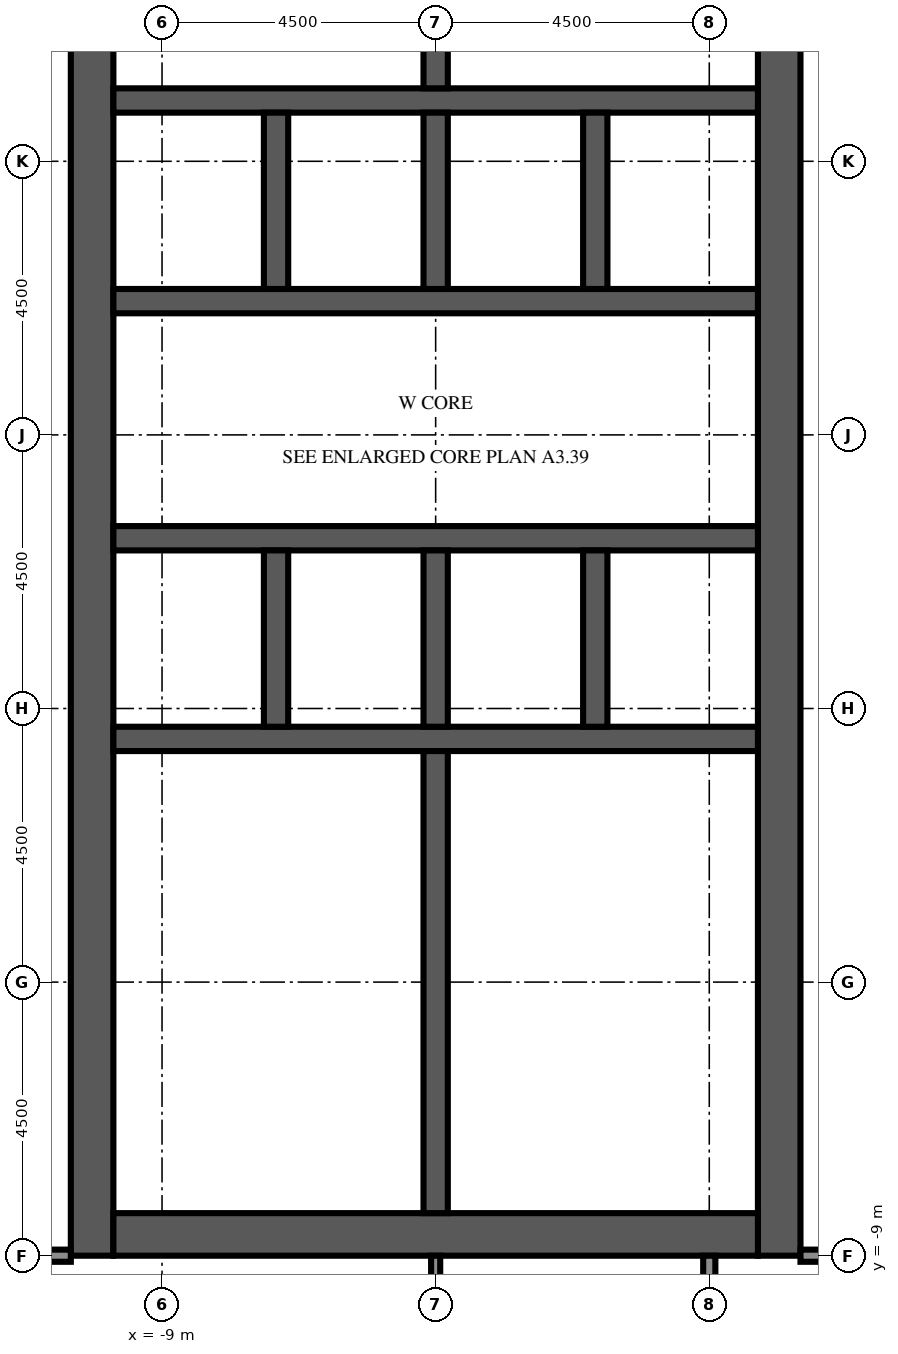
"""IFC4 building model, lengths in metres.
Left out: names, types, materials, properties, quantities, classifications, styles, units other than length and angle.
Written with IfcOpenShell. Run it as: python <this file> out.ifc"""

import sys

from ifc_helpers import new_model, si_unit, direction, frame, frame_2d, origin, place, context, subcontext, project, spatial, rectangle, extrude, element, fill, save


model = new_model("IFC4")
c1 = context("Model", 3, precision=1e-05, world=origin(), true_north=direction((0.0, 1.0)))
c2 = subcontext(c1, "Body", "Model", "MODEL_VIEW")
j1 = project(units=[si_unit("LENGTHUNIT", "METRE"), si_unit("PLANEANGLEUNIT", "RADIAN")], contexts=[c1])
p1 = place(None, origin())
s1 = spatial("IfcSite", under=j1, at=p1, CompositionType="ELEMENT")
p2 = place(p1, origin())
s2 = spatial("IfcBuilding", under=s1, at=p2, CompositionType="ELEMENT")
p3 = place(p2, frame((0.0, 0.0, 266.3)))
s3 = spatial("IfcBuildingStorey", under=s2, at=p3, CompositionType="ELEMENT", Elevation=266.3)
p4 = place(p3, frame((-10.15, -9.0, 0.0), z_axis=(0.0, 0.0, 1.0), x_axis=(0.0, 1.0, 0.0)))
e1 = element("IfcWall", 1, at=p4, inside=s3, PredefinedType="SHEAR", context=c2, shape_type="SweptSolid", body=[
    extrude(rectangle(XDim=27.5, YDim=0.7, at=frame_2d((13.75, 0.0))), origin(), (0.0, 0.0, 1.0), 4.1),
])
p5 = place(p4, frame((12.55, 0.0, 0.0)))
e2 = element("IfcOpeningElement", 2, at=p5, cuts=e1, PredefinedType="OPENING", context=c2, shape_type="SweptSolid", body=[
    extrude(rectangle(XDim=2.4, YDim=2.4, at=frame_2d((1.2, 1.2))), frame((0.0, 0.36, 0.0), z_axis=(0.0, -1.0, 0.0), x_axis=(1.0, 0.0, 0.0)), (0.0, 0.0, 1.0), 0.72),
])
p6 = place(p4, frame((6.825, 0.0, 0.0)))
e3 = element("IfcOpeningElement", 3, at=p6, cuts=e1, PredefinedType="OPENING", context=c2, shape_type="SweptSolid", body=[
    extrude(rectangle(XDim=1.2, YDim=2.1, at=frame_2d((0.6, 1.05))), frame((0.0, 0.36, 0.0), z_axis=(0.0, -1.0, 0.0), x_axis=(1.0, 0.0, 0.0)), (0.0, 0.0, 1.0), 0.72),
])
p7 = place(p4, frame((19.475, 0.0, 0.0)))
e4 = element("IfcOpeningElement", 4, at=p7, cuts=e1, PredefinedType="OPENING", context=c2, shape_type="SweptSolid", body=[
    extrude(rectangle(XDim=1.2, YDim=2.1, at=frame_2d((0.6, 1.05))), frame((0.0, 0.36, 0.0), z_axis=(0.0, -1.0, 0.0), x_axis=(1.0, 0.0, 0.0)), (0.0, 0.0, 1.0), 0.72),
])
p8 = place(p3, frame((1.15, -9.0, 0.0), z_axis=(0.0, 0.0, 1.0), x_axis=(0.0, 1.0, 0.0)))
e5 = element("IfcWall", 5, at=p8, inside=s3, PredefinedType="SHEAR", context=c2, shape_type="SweptSolid", body=[
    extrude(rectangle(XDim=27.5, YDim=0.7, at=frame_2d((13.75, 0.0))), origin(), (0.0, 0.0, 1.0), 4.1),
])
p9 = place(p8, frame((12.55, 0.0, 0.0)))
e6 = element("IfcOpeningElement", 6, at=p9, cuts=e5, PredefinedType="OPENING", context=c2, shape_type="SweptSolid", body=[
    extrude(rectangle(XDim=2.4, YDim=2.4, at=frame_2d((1.2, 1.2))), frame((0.0, 0.36, 0.0), z_axis=(0.0, -1.0, 0.0), x_axis=(1.0, 0.0, 0.0)), (0.0, 0.0, 1.0), 0.72),
])
p10 = place(p8, frame((3.788, 0.0, 0.0)))
e7 = element("IfcOpeningElement", 7, at=p10, cuts=e5, PredefinedType="OPENING", context=c2, shape_type="SweptSolid", body=[
    extrude(rectangle(XDim=0.968, YDim=2.1, at=frame_2d((0.484, 1.05))), frame((0.0, 0.36, 0.0), z_axis=(0.0, -1.0, 0.0), x_axis=(1.0, 0.0, 0.0)), (0.0, 0.0, 1.0), 0.72),
])
p11 = place(p8, frame((23.54, 0.0, 0.0)))
e8 = element("IfcOpeningElement", 8, at=p11, cuts=e5, PredefinedType="OPENING", context=c2, shape_type="SweptSolid", body=[
    extrude(rectangle(XDim=1.2, YDim=2.1, at=frame_2d((0.6, 1.05))), frame((0.0, 0.36, 0.0), z_axis=(0.0, -1.0, 0.0), x_axis=(1.0, 0.0, 0.0)), (0.0, 0.0, 1.0), 0.72),
])
p12 = place(p3, frame((-9.8, -8.65, 0.0), z_axis=(0.0, 0.0, 1.0), x_axis=(1.0, 0.0, 0.0)))
e9 = element("IfcWall", 9, at=p12, inside=s3, PredefinedType="SHEAR", context=c2, shape_type="SweptSolid", body=[
    extrude(rectangle(XDim=10.6, YDim=0.7, at=frame_2d((5.3, 0.0))), origin(), (0.0, 0.0, 1.0), 4.1),
])
p13 = place(p3, frame((-9.8, -0.5, 0.0), z_axis=(0.0, 0.0, 1.0), x_axis=(1.0, 0.0, 0.0)))
e10 = element("IfcWall", 10, at=p13, inside=s3, PredefinedType="SHEAR", context=c2, shape_type="SweptSolid", body=[
    extrude(rectangle(XDim=10.6, YDim=0.4, at=frame_2d((5.3, 0.0))), origin(), (0.0, 0.0, 1.0), 4.1),
])
p14 = place(p3, frame((-9.8, 2.8, 0.0), z_axis=(0.0, 0.0, 1.0), x_axis=(1.0, 0.0, 0.0)))
e11 = element("IfcWall", 11, at=p14, inside=s3, PredefinedType="SHEAR", context=c2, shape_type="SweptSolid", body=[
    extrude(rectangle(XDim=10.6, YDim=0.4, at=frame_2d((5.3, 0.0))), origin(), (0.0, 0.0, 1.0), 4.1),
])
p15 = place(p14, frame((0.688, 0.0, 0.0)))
e12 = element("IfcOpeningElement", 12, at=p15, cuts=e11, PredefinedType="OPENING", context=c2, shape_type="SweptSolid", body=[
    extrude(rectangle(XDim=1.1, YDim=2.1, at=frame_2d((0.55, 1.05))), frame((0.0, 0.21, 0.0), z_axis=(0.0, -1.0, 0.0), x_axis=(1.0, 0.0, 0.0)), (0.0, 0.0, 1.0), 0.42),
])
p16 = place(p14, frame((3.438, 0.0, 0.0)))
e13 = element("IfcOpeningElement", 13, at=p16, cuts=e11, PredefinedType="OPENING", context=c2, shape_type="SweptSolid", body=[
    extrude(rectangle(XDim=1.1, YDim=2.1, at=frame_2d((0.55, 1.05))), frame((0.0, 0.21, 0.0), z_axis=(0.0, -1.0, 0.0), x_axis=(1.0, 0.0, 0.0)), (0.0, 0.0, 1.0), 0.42),
])
p17 = place(p14, frame((6.113, 0.0, 0.0)))
e14 = element("IfcOpeningElement", 14, at=p17, cuts=e11, PredefinedType="OPENING", context=c2, shape_type="SweptSolid", body=[
    extrude(rectangle(XDim=1.0, YDim=2.1, at=frame_2d((0.5, 1.05))), frame((0.0, 0.21, 0.0), z_axis=(0.0, -1.0, 0.0), x_axis=(1.0, 0.0, 0.0)), (0.0, 0.0, 1.0), 0.42),
])
p18 = place(p14, frame((8.863, 0.0, 0.0)))
e15 = element("IfcOpeningElement", 15, at=p18, cuts=e11, PredefinedType="OPENING", context=c2, shape_type="SweptSolid", body=[
    extrude(rectangle(XDim=1.0, YDim=2.1, at=frame_2d((0.5, 1.05))), frame((0.0, 0.21, 0.0), z_axis=(0.0, -1.0, 0.0), x_axis=(1.0, 0.0, 0.0)), (0.0, 0.0, 1.0), 0.42),
])
p19 = place(p3, frame((-9.8, 6.7, 0.0), z_axis=(0.0, 0.0, 1.0), x_axis=(1.0, 0.0, 0.0)))
e16 = element("IfcWall", 16, at=p19, inside=s3, PredefinedType="SHEAR", context=c2, shape_type="SweptSolid", body=[
    extrude(rectangle(XDim=10.6, YDim=0.4, at=frame_2d((5.3, 0.0))), origin(), (0.0, 0.0, 1.0), 4.1),
])
p20 = place(p19, frame((3.438, 0.0, 0.0)))
e17 = element("IfcOpeningElement", 17, at=p20, cuts=e16, PredefinedType="OPENING", context=c2, shape_type="SweptSolid", body=[
    extrude(rectangle(XDim=1.1, YDim=2.1, at=frame_2d((0.55, 1.05))), frame((0.0, 0.21, 0.0), z_axis=(0.0, -1.0, 0.0), x_axis=(1.0, 0.0, 0.0)), (0.0, 0.0, 1.0), 0.42),
])
p21 = place(p19, frame((6.062, 0.0, 0.0)))
e18 = element("IfcOpeningElement", 18, at=p21, cuts=e16, PredefinedType="OPENING", context=c2, shape_type="SweptSolid", body=[
    extrude(rectangle(XDim=1.1, YDim=2.1, at=frame_2d((0.55, 1.05))), frame((0.0, 0.21, 0.0), z_axis=(0.0, -1.0, 0.0), x_axis=(1.0, 0.0, 0.0)), (0.0, 0.0, 1.0), 0.42),
])
p22 = place(p19, frame((8.812, 0.0, 0.0)))
e19 = element("IfcOpeningElement", 19, at=p22, cuts=e16, PredefinedType="OPENING", context=c2, shape_type="SweptSolid", body=[
    extrude(rectangle(XDim=1.1, YDim=2.1, at=frame_2d((0.55, 1.05))), frame((0.0, 0.21, 0.0), z_axis=(0.0, -1.0, 0.0), x_axis=(1.0, 0.0, 0.0)), (0.0, 0.0, 1.0), 0.42),
])
p23 = place(p19, frame((0.738, 0.0, 0.0)))
e20 = element("IfcOpeningElement", 20, at=p23, cuts=e16, PredefinedType="OPENING", context=c2, shape_type="SweptSolid", body=[
    extrude(rectangle(XDim=1.0, YDim=2.1, at=frame_2d((0.5, 1.05))), frame((0.0, 0.21, 0.0), z_axis=(0.0, -1.0, 0.0), x_axis=(1.0, 0.0, 0.0)), (0.0, 0.0, 1.0), 0.42),
])
p24 = place(p3, frame((-9.8, 10.0, 0.0), z_axis=(0.0, 0.0, 1.0), x_axis=(1.0, 0.0, 0.0)))
e21 = element("IfcWall", 21, at=p24, inside=s3, PredefinedType="SHEAR", context=c2, shape_type="SweptSolid", body=[
    extrude(rectangle(XDim=10.6, YDim=0.4, at=frame_2d((5.3, 0.0))), origin(), (0.0, 0.0, 1.0), 4.1),
])
for number, where, z_axis, x_axis in (
    (22, (-7.125, -0.3, 0.0), (0.0, 0.0, 1.0), (0.0, 1.0, 0.0)),
    (23, (-7.125, 6.9, 0.0), (0.0, 0.0, 1.0), (0.0, 1.0, 0.0)),
    (24, (-4.5, -0.3, 0.0), (0.0, 0.0, 1.0), (0.0, 1.0, 0.0)),
    (25, (-4.5, 6.9, 0.0), (0.0, 0.0, 1.0), (0.0, 1.0, 0.0)),
    (26, (-1.875, -0.3, 0.0), (0.0, 0.0, 1.0), (0.0, 1.0, 0.0)),
    (27, (-1.875, 6.9, 0.0), (0.0, 0.0, 1.0), (0.0, 1.0, 0.0)),
):
    element("IfcWall", number, at=place(p3, frame(where, z_axis=z_axis, x_axis=x_axis)), inside=s3, PredefinedType="SHEAR", context=c2, shape_type="SweptSolid", body=[
        extrude(rectangle(XDim=2.9, YDim=0.4, at=frame_2d((1.45, 0.0))), origin(), (0.0, 0.0, 1.0), 4.1),
    ])
for number, where, z_axis, x_axis in (
    (28, (-4.5, -8.3, 0.0), (0.0, 0.0, 1.0), (0.0, 1.0, 0.0)),
    (29, (-4.5, 10.2, 0.0), (0.0, 0.0, 1.0), (0.0, 1.0, 0.0)),
):
    element("IfcWall", number, at=place(p3, frame(where, z_axis=z_axis, x_axis=x_axis)), inside=s3, PredefinedType="SHEAR", context=c2, shape_type="SweptSolid", body=[
        extrude(rectangle(XDim=7.6, YDim=0.4, at=frame_2d((3.8, 0.0))), origin(), (0.0, 0.0, 1.0), 4.1),
    ])
p25 = place(p3, frame((-4.3, -5.412, 0.0), z_axis=(0.0, 0.0, 1.0), x_axis=(1.0, 0.0, 0.0)))
e30 = element("IfcWall", 30, at=p25, inside=s3, PredefinedType="PARTITIONING", context=c2, shape_type="SweptSolid", body=[
    extrude(rectangle(XDim=5.1, YDim=0.1, at=frame_2d((2.55, 0.0))), origin(), (0.0, 0.0, 1.0), 3.65),
])
p26 = place(p25, frame((2.05, 0.0, 0.0)))
e31 = element("IfcOpeningElement", 31, at=p26, cuts=e30, PredefinedType="OPENING", context=c2, shape_type="SweptSolid", body=[
    extrude(rectangle(XDim=1.0, YDim=2.1, at=frame_2d((0.5, 1.05))), frame((0.0, 0.06, 0.0), z_axis=(0.0, -1.0, 0.0), x_axis=(1.0, 0.0, 0.0)), (0.0, 0.0, 1.0), 0.12),
])
p27 = place(p3, frame((-2.362, -4.044, 0.0), z_axis=(0.0, 0.0, 1.0), x_axis=(1.0, 0.0, 0.0)))
e32 = element("IfcWall", 32, at=p27, inside=s3, PredefinedType="PARTITIONING", context=c2, shape_type="SweptSolid", body=[
    extrude(rectangle(XDim=3.162, YDim=0.1, at=frame_2d((1.581, 0.0))), origin(), (0.0, 0.0, 1.0), 3.65),
])
p28 = place(p27, frame((1.081, 0.0, 0.0)))
e33 = element("IfcOpeningElement", 33, at=p28, cuts=e32, PredefinedType="OPENING", context=c2, shape_type="SweptSolid", body=[
    extrude(rectangle(XDim=1.0, YDim=2.1, at=frame_2d((0.5, 1.05))), frame((0.0, 0.06, 0.0), z_axis=(0.0, -1.0, 0.0), x_axis=(1.0, 0.0, 0.0)), (0.0, 0.0, 1.0), 0.12),
])
p29 = place(p3, frame((-4.3, -4.044, 0.0), z_axis=(0.0, 0.0, 1.0), x_axis=(1.0, 0.0, 0.0)))
e34 = element("IfcWall", 34, at=p29, inside=s3, PredefinedType="PARTITIONING", context=c2, shape_type="SweptSolid", body=[
    extrude(rectangle(XDim=1.938, YDim=0.1, at=frame_2d((0.969, 0.0))), origin(), (0.0, 0.0, 1.0), 3.65),
])
p30 = place(p29, frame((0.469, 0.0, 0.0)))
e35 = element("IfcOpeningElement", 35, at=p30, cuts=e34, PredefinedType="OPENING", context=c2, shape_type="SweptSolid", body=[
    extrude(rectangle(XDim=1.0, YDim=2.1, at=frame_2d((0.5, 1.05))), frame((0.0, 0.06, 0.0), z_axis=(0.0, -1.0, 0.0), x_axis=(1.0, 0.0, 0.0)), (0.0, 0.0, 1.0), 0.12),
])
p31 = place(p3, frame((-2.362, -4.044, 0.0), z_axis=(0.0, 0.0, 1.0), x_axis=(0.0, 1.0, 0.0)))
e36 = element("IfcWall", 36, at=p31, inside=s3, PredefinedType="PARTITIONING", context=c2, shape_type="SweptSolid", body=[
    extrude(rectangle(XDim=3.344, YDim=0.1, at=frame_2d((1.672, 0.0))), origin(), (0.0, 0.0, 1.0), 3.65),
])
p32 = place(p3, frame((-4.5, -9.0, 0.0), z_axis=(0.0, 0.0, 1.0), x_axis=(0.0, -1.0, 0.0)))
e37 = element("IfcWall", 37, at=p32, inside=s3, PredefinedType="PARTITIONING", context=c2, shape_type="SweptSolid", body=[
    extrude(rectangle(XDim=8.6, YDim=0.15, at=frame_2d((4.3, 0.0))), origin(), (0.0, 0.0, 1.0), 3.65),
])
p33 = place(p32, frame((4.15, 0.0, 0.0)))
e38 = element("IfcOpeningElement", 38, at=p33, cuts=e37, PredefinedType="OPENING", context=c2, shape_type="SweptSolid", body=[
    extrude(rectangle(XDim=1.0, YDim=2.1, at=frame_2d((0.5, 1.05))), frame((0.0, 0.085, 0.0), z_axis=(0.0, -1.0, 0.0), x_axis=(1.0, 0.0, 0.0)), (0.0, 0.0, 1.0), 0.17),
])
p34 = place(p3, frame((0.0, -17.6, 0.0), z_axis=(0.0, 0.0, 1.0), x_axis=(0.0, 1.0, 0.0)))
e39 = element("IfcWall", 39, at=p34, inside=s3, PredefinedType="PARTITIONING", context=c2, shape_type="SweptSolid", body=[
    extrude(rectangle(XDim=8.6, YDim=0.2, at=frame_2d((4.3, 0.0))), origin(), (0.0, 0.0, 1.0), 3.65),
])
p35 = place(p3, frame((-13.5, -9.0, 0.0), z_axis=(0.0, 0.0, 1.0), x_axis=(1.0, 0.0, 0.0)))
e40 = element("IfcWall", 40, at=p35, inside=s3, PredefinedType="PARTITIONING", context=c2, shape_type="SweptSolid", body=[
    extrude(rectangle(XDim=3.0, YDim=0.2, at=frame_2d((1.5, 0.0))), origin(), (0.0, 0.0, 1.0), 3.65),
])
p36 = place(p3, frame((6.0, -9.0, 0.0), z_axis=(0.0, 0.0, 1.0), x_axis=(-1.0, 0.0, 0.0)))
e41 = element("IfcWall", 41, at=p36, inside=s3, PredefinedType="PARTITIONING", context=c2, shape_type="SweptSolid", body=[
    extrude(rectangle(XDim=4.5, YDim=0.2, at=frame_2d((2.25, 0.0))), origin(), (0.0, 0.0, 1.0), 3.65),
])
p37 = place(p36, frame((2.4, 0.0, 0.0)))
e42 = element("IfcOpeningElement", 42, at=p37, cuts=e41, PredefinedType="OPENING", context=c2, shape_type="SweptSolid", body=[
    extrude(rectangle(XDim=1.0, YDim=2.1, at=frame_2d((0.5, 1.05))), frame((0.0, 0.11, 0.0), z_axis=(0.0, -1.0, 0.0), x_axis=(1.0, 0.0, 0.0)), (0.0, 0.0, 1.0), 0.22),
])
p38 = place(p36, frame((0.4, 0.0, 0.0)))
e43 = element("IfcOpeningElement", 43, at=p38, cuts=e41, PredefinedType="OPENING", context=c2, shape_type="SweptSolid", body=[
    extrude(rectangle(XDim=1.0, YDim=2.1, at=frame_2d((0.5, 1.05))), frame((0.0, 0.11, 0.0), z_axis=(0.0, -1.0, 0.0), x_axis=(1.0, 0.0, 0.0)), (0.0, 0.0, 1.0), 0.22),
])
p39 = place(p15, origin())
e44 = element("IfcDoor", 44, at=p39, inside=s3, OperationType="DOUBLE_DOOR_SLIDING", PredefinedType="DOOR", context=c2, shape_type="SweptSolid", body=[
    extrude(rectangle(XDim=1.1, YDim=2.1, at=frame_2d((0.55, 1.05))), frame((0.0, 0.025, 0.0), z_axis=(0.0, -1.0, 0.0), x_axis=(1.0, 0.0, 0.0)), (0.0, 0.0, 1.0), 0.05),
])
fill(e12, e44)
p40 = place(p16, origin())
e45 = element("IfcDoor", 45, at=p40, inside=s3, OperationType="DOUBLE_DOOR_SLIDING", PredefinedType="DOOR", context=c2, shape_type="SweptSolid", body=[
    extrude(rectangle(XDim=1.1, YDim=2.1, at=frame_2d((0.55, 1.05))), frame((0.0, 0.025, 0.0), z_axis=(0.0, -1.0, 0.0), x_axis=(1.0, 0.0, 0.0)), (0.0, 0.0, 1.0), 0.05),
])
fill(e13, e45)
p41 = place(p20, origin())
e46 = element("IfcDoor", 46, at=p41, inside=s3, OperationType="DOUBLE_DOOR_SLIDING", PredefinedType="DOOR", context=c2, shape_type="SweptSolid", body=[
    extrude(rectangle(XDim=1.1, YDim=2.1, at=frame_2d((0.55, 1.05))), frame((0.0, 0.025, 0.0), z_axis=(0.0, -1.0, 0.0), x_axis=(1.0, 0.0, 0.0)), (0.0, 0.0, 1.0), 0.05),
])
fill(e17, e46)
p42 = place(p21, origin())
e47 = element("IfcDoor", 47, at=p42, inside=s3, OperationType="DOUBLE_DOOR_SLIDING", PredefinedType="DOOR", context=c2, shape_type="SweptSolid", body=[
    extrude(rectangle(XDim=1.1, YDim=2.1, at=frame_2d((0.55, 1.05))), frame((0.0, 0.025, 0.0), z_axis=(0.0, -1.0, 0.0), x_axis=(1.0, 0.0, 0.0)), (0.0, 0.0, 1.0), 0.05),
])
fill(e18, e47)
p43 = place(p22, origin())
e48 = element("IfcDoor", 48, at=p43, inside=s3, OperationType="DOUBLE_DOOR_SLIDING", PredefinedType="DOOR", context=c2, shape_type="SweptSolid", body=[
    extrude(rectangle(XDim=1.1, YDim=2.1, at=frame_2d((0.55, 1.05))), frame((0.0, 0.025, 0.0), z_axis=(0.0, -1.0, 0.0), x_axis=(1.0, 0.0, 0.0)), (0.0, 0.0, 1.0), 0.05),
])
fill(e19, e48)
p44 = place(p5, origin())
e49 = element("IfcDoor", 49, at=p44, inside=s3, OperationType="DOUBLE_DOOR_DOUBLE_SWING", PredefinedType="DOOR", context=c2, shape_type="SweptSolid", body=[
    extrude(rectangle(XDim=2.4, YDim=2.4, at=frame_2d((1.2, 1.2))), frame((0.0, 0.025, 0.0), z_axis=(0.0, -1.0, 0.0), x_axis=(1.0, 0.0, 0.0)), (0.0, 0.0, 1.0), 0.05),
])
fill(e2, e49)
p45 = place(p9, origin())
e50 = element("IfcDoor", 50, at=p45, inside=s3, OperationType="DOUBLE_DOOR_DOUBLE_SWING", PredefinedType="DOOR", context=c2, shape_type="SweptSolid", body=[
    extrude(rectangle(XDim=2.4, YDim=2.4, at=frame_2d((1.2, 1.2))), frame((0.0, 0.025, 0.0), z_axis=(0.0, -1.0, 0.0), x_axis=(1.0, 0.0, 0.0)), (0.0, 0.0, 1.0), 0.05),
])
fill(e6, e50)
p46 = place(p6, origin())
e51 = element("IfcDoor", 51, at=p46, inside=s3, OperationType="SINGLE_SWING_LEFT", PredefinedType="DOOR", context=c2, shape_type="SweptSolid", body=[
    extrude(rectangle(XDim=1.2, YDim=2.1, at=frame_2d((0.6, 1.05))), frame((0.0, 0.025, 0.0), z_axis=(0.0, -1.0, 0.0), x_axis=(1.0, 0.0, 0.0)), (0.0, 0.0, 1.0), 0.05),
])
fill(e3, e51)
p47 = place(p7, origin())
e52 = element("IfcDoor", 52, at=p47, inside=s3, OperationType="SINGLE_SWING_LEFT", PredefinedType="DOOR", context=c2, shape_type="SweptSolid", body=[
    extrude(rectangle(XDim=1.2, YDim=2.1, at=frame_2d((0.6, 1.05))), frame((0.0, 0.025, 0.0), z_axis=(0.0, -1.0, 0.0), x_axis=(1.0, 0.0, 0.0)), (0.0, 0.0, 1.0), 0.05),
])
fill(e4, e52)
p48 = place(p17, origin())
e53 = element("IfcDoor", 53, at=p48, inside=s3, OperationType="SINGLE_SWING_LEFT", PredefinedType="DOOR", context=c2, shape_type="SweptSolid", body=[
    extrude(rectangle(XDim=1.0, YDim=2.1, at=frame_2d((0.5, 1.05))), frame((0.0, 0.025, 0.0), z_axis=(0.0, -1.0, 0.0), x_axis=(1.0, 0.0, 0.0)), (0.0, 0.0, 1.0), 0.05),
])
fill(e14, e53)
p49 = place(p18, origin())
e54 = element("IfcDoor", 54, at=p49, inside=s3, OperationType="SINGLE_SWING_RIGHT", PredefinedType="DOOR", context=c2, shape_type="SweptSolid", body=[
    extrude(rectangle(XDim=1.0, YDim=2.1, at=frame_2d((0.5, 1.05))), frame((0.0, 0.025, 0.0), z_axis=(0.0, -1.0, 0.0), x_axis=(1.0, 0.0, 0.0)), (0.0, 0.0, 1.0), 0.05),
])
fill(e15, e54)
p50 = place(p23, origin())
e55 = element("IfcDoor", 55, at=p50, inside=s3, OperationType="SINGLE_SWING_LEFT", PredefinedType="DOOR", context=c2, shape_type="SweptSolid", body=[
    extrude(rectangle(XDim=1.0, YDim=2.1, at=frame_2d((0.5, 1.05))), frame((0.0, 0.025, 0.0), z_axis=(0.0, -1.0, 0.0), x_axis=(1.0, 0.0, 0.0)), (0.0, 0.0, 1.0), 0.05),
])
fill(e20, e55)
p51 = place(p10, origin())
e56 = element("IfcDoor", 56, at=p51, inside=s3, OperationType="SINGLE_SWING_LEFT", PredefinedType="DOOR", context=c2, shape_type="SweptSolid", body=[
    extrude(rectangle(XDim=0.968, YDim=2.1, at=frame_2d((0.484, 1.05))), frame((0.0, 0.325, 0.0), z_axis=(0.0, -1.0, 0.0), x_axis=(1.0, 0.0, 0.0)), (0.0, 0.0, 1.0), 0.05),
])
fill(e7, e56)
p52 = place(p26, origin())
e57 = element("IfcDoor", 57, at=p52, inside=s3, OperationType="SINGLE_SWING_RIGHT", PredefinedType="DOOR", context=c2, shape_type="SweptSolid", body=[
    extrude(rectangle(XDim=1.0, YDim=2.1, at=frame_2d((0.5, 1.05))), frame((0.0, 0.025, 0.0), z_axis=(0.0, -1.0, 0.0), x_axis=(1.0, 0.0, 0.0)), (0.0, 0.0, 1.0), 0.05),
])
fill(e31, e57)
p53 = place(p28, origin())
e58 = element("IfcDoor", 58, at=p53, inside=s3, OperationType="SINGLE_SWING_LEFT", PredefinedType="DOOR", context=c2, shape_type="SweptSolid", body=[
    extrude(rectangle(XDim=1.0, YDim=2.1, at=frame_2d((0.5, 1.05))), frame((0.0, 0.025, 0.0), z_axis=(0.0, -1.0, 0.0), x_axis=(1.0, 0.0, 0.0)), (0.0, 0.0, 1.0), 0.05),
])
fill(e33, e58)
p54 = place(p30, origin())
e59 = element("IfcDoor", 59, at=p54, inside=s3, OperationType="SINGLE_SWING_RIGHT", PredefinedType="DOOR", context=c2, shape_type="SweptSolid", body=[
    extrude(rectangle(XDim=1.0, YDim=2.1, at=frame_2d((0.5, 1.05))), frame((0.0, 0.025, 0.0), z_axis=(0.0, -1.0, 0.0), x_axis=(1.0, 0.0, 0.0)), (0.0, 0.0, 1.0), 0.05),
])
fill(e35, e59)
save(model, sys.argv[1])
